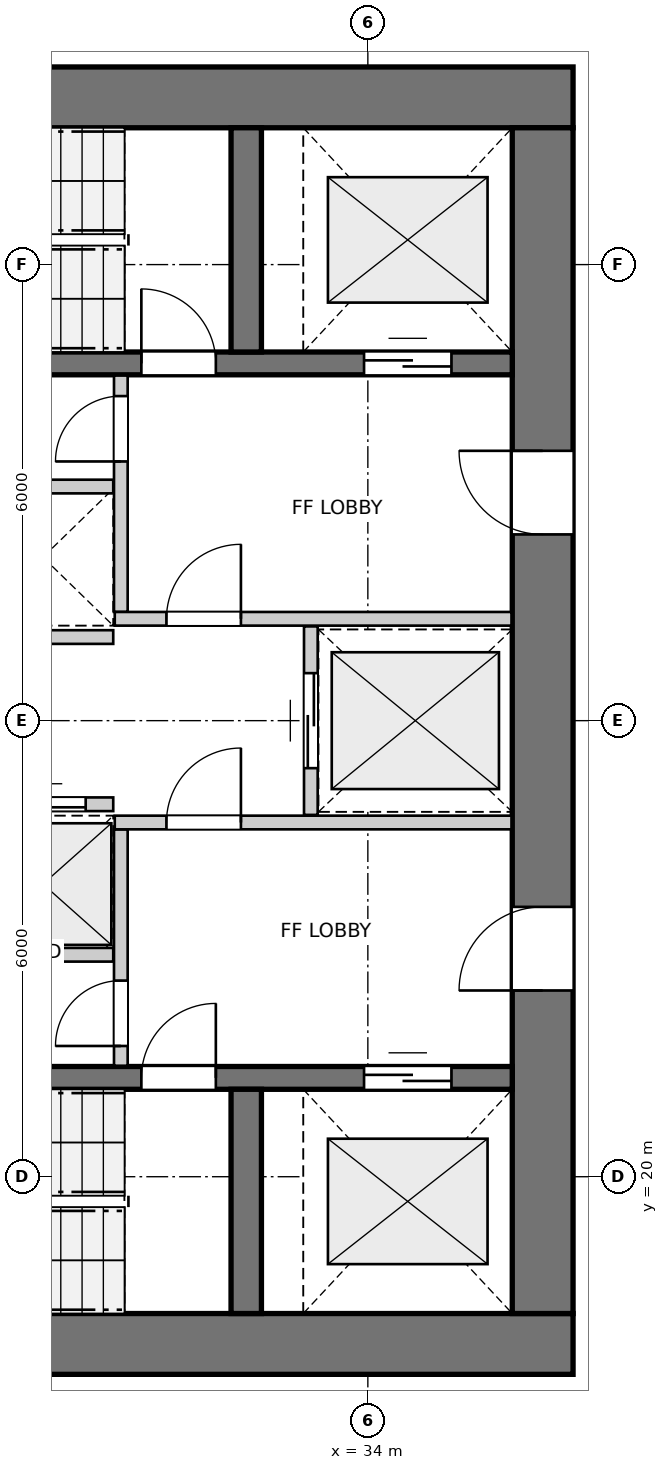
"""IFC4 building model, lengths in metres.
Left out: names, types, materials, properties, quantities, classifications, styles, units other than length and angle.
Written with IfcOpenShell. Run it as: python <this file> out.ifc"""

import sys

from ifc_helpers import new_model, si_unit, direction, frame, frame_2d, origin, place, context, subcontext, project, spatial, rectangle, extrude, source, transform, mapped, element, fill, save


model = new_model("IFC4")
c1 = context("Model", 3, precision=1e-05, world=origin(), true_north=direction((0.0, 1.0)))
c2 = subcontext(c1, "Body", "Model", "MODEL_VIEW")
j1 = project(units=[si_unit("LENGTHUNIT", "METRE"), si_unit("PLANEANGLEUNIT", "RADIAN")], contexts=[c1])
p1 = place(None, origin())
s1 = spatial("IfcSite", under=j1, at=p1, CompositionType="ELEMENT")
p2 = place(p1, origin())
s2 = spatial("IfcBuilding", under=s1, at=p2, CompositionType="ELEMENT")
p3 = place(p2, frame((0.0, 0.0, 14.2)))
s3 = spatial("IfcBuildingStorey", under=s2, at=p3, CompositionType="ELEMENT", Elevation=14.2)
for number, where, z_axis, x_axis in (
    (1, (24.0, 17.8, 0.0), (0.0, 0.0, 1.0), (1.0, 0.0, 0.0)),
    (2, (36.7, 34.2, 0.0), (0.0, 0.0, 1.0), (-1.0, 0.0, 0.0)),
):
    element("IfcWall", number, at=place(p3, frame(where, z_axis=z_axis, x_axis=x_axis)), inside=s3, PredefinedType="SHEAR", context=c2, shape_type="SweptSolid", body=[
        extrude(rectangle(XDim=12.7, YDim=0.8, at=frame_2d((6.35, 0.0))), origin(), (0.0, 0.0, 1.0), 2.94),
    ])
p4 = place(p3, frame((36.3, 18.2, 0.0), z_axis=(0.0, 0.0, 1.0), x_axis=(0.0, 1.0, 0.0)))
e3 = element("IfcWall", 3, at=p4, inside=s3, PredefinedType="SHEAR", context=c2, shape_type="SweptSolid", body=[
    extrude(rectangle(XDim=15.6, YDim=0.8, at=frame_2d((7.8, 0.0))), origin(), (0.0, 0.0, 1.0), 2.94),
])
p5 = place(p4, frame((4.25, 0.0, 0.0)))
e4 = element("IfcOpeningElement", 4, at=p5, cuts=e3, PredefinedType="OPENING", context=c2, shape_type="SweptSolid", body=[
    extrude(rectangle(XDim=1.1, YDim=2.15, at=frame_2d((0.55, 1.075))), frame((0.0, 0.41, 0.0), z_axis=(0.0, -1.0, 0.0), x_axis=(1.0, 0.0, 0.0)), (0.0, 0.0, 1.0), 0.82),
])
p6 = place(p4, frame((10.25, 0.0, 0.0)))
e5 = element("IfcOpeningElement", 5, at=p6, cuts=e3, PredefinedType="OPENING", context=c2, shape_type="SweptSolid", body=[
    extrude(rectangle(XDim=1.1, YDim=2.15, at=frame_2d((0.55, 1.075))), frame((0.0, 0.41, 0.0), z_axis=(0.0, -1.0, 0.0), x_axis=(1.0, 0.0, 0.0)), (0.0, 0.0, 1.0), 0.82),
])
p7 = place(p3, frame((24.8, 21.3, 0.0), z_axis=(0.0, 0.0, 1.0), x_axis=(1.0, 0.0, 0.0)))
e6 = element("IfcWall", 6, at=p7, inside=s3, PredefinedType="SHEAR", context=c2, shape_type="SweptSolid", body=[
    extrude(rectangle(XDim=11.1, YDim=0.3, at=frame_2d((5.55, 0.0))), origin(), (0.0, 0.0, 1.0), 2.94),
])
p8 = place(p7, frame((6.22, 0.0, 0.0)))
e7 = element("IfcOpeningElement", 7, at=p8, cuts=e6, PredefinedType="OPENING", context=c2, shape_type="SweptSolid", body=[
    extrude(rectangle(XDim=0.98, YDim=2.15, at=frame_2d((0.49, 1.075))), frame((0.0, 0.16, 0.0), z_axis=(0.0, -1.0, 0.0), x_axis=(1.0, 0.0, 0.0)), (0.0, 0.0, 1.0), 0.32),
])
p9 = place(p7, frame((9.15, 0.0, 0.0)))
e8 = element("IfcOpeningElement", 8, at=p9, cuts=e6, PredefinedType="OPENING", context=c2, shape_type="SweptSolid", body=[
    extrude(rectangle(XDim=1.15, YDim=2.15, at=frame_2d((0.575, 1.075))), frame((0.0, 0.16, 0.0), z_axis=(0.0, -1.0, 0.0), x_axis=(1.0, 0.0, 0.0)), (0.0, 0.0, 1.0), 0.32),
])
p10 = place(p3, frame((32.4, 18.2, 0.0), z_axis=(0.0, 0.0, 1.0), x_axis=(0.0, 1.0, 0.0)))
e9 = element("IfcWall", 9, at=p10, inside=s3, PredefinedType="SHEAR", context=c2, shape_type="SweptSolid", body=[
    extrude(rectangle(XDim=2.95, YDim=0.4, at=frame_2d((1.475, 0.0))), origin(), (0.0, 0.0, 1.0), 2.94),
])
p11 = place(p3, frame((24.8, 30.7, 0.0), z_axis=(0.0, 0.0, 1.0), x_axis=(1.0, 0.0, 0.0)))
e10 = element("IfcWall", 10, at=p11, inside=s3, PredefinedType="SHEAR", context=c2, shape_type="SweptSolid", body=[
    extrude(rectangle(XDim=11.1, YDim=0.3, at=frame_2d((5.55, 0.0))), origin(), (0.0, 0.0, 1.0), 2.94),
])
p12 = place(p11, frame((6.22, 0.0, 0.0)))
e11 = element("IfcOpeningElement", 11, at=p12, cuts=e10, PredefinedType="OPENING", context=c2, shape_type="SweptSolid", body=[
    extrude(rectangle(XDim=0.98, YDim=2.15, at=frame_2d((0.49, 1.075))), frame((0.0, 0.16, 0.0), z_axis=(0.0, -1.0, 0.0), x_axis=(1.0, 0.0, 0.0)), (0.0, 0.0, 1.0), 0.32),
])
p13 = place(p11, frame((9.15, 0.0, 0.0)))
e12 = element("IfcOpeningElement", 12, at=p13, cuts=e10, PredefinedType="OPENING", context=c2, shape_type="SweptSolid", body=[
    extrude(rectangle(XDim=1.15, YDim=2.15, at=frame_2d((0.575, 1.075))), frame((0.0, 0.16, 0.0), z_axis=(0.0, -1.0, 0.0), x_axis=(1.0, 0.0, 0.0)), (0.0, 0.0, 1.0), 0.32),
])
p14 = place(p3, frame((32.4, 30.85, 0.0), z_axis=(0.0, 0.0, 1.0), x_axis=(0.0, 1.0, 0.0)))
e13 = element("IfcWall", 13, at=p14, inside=s3, PredefinedType="SHEAR", context=c2, shape_type="SweptSolid", body=[
    extrude(rectangle(XDim=2.95, YDim=0.4, at=frame_2d((1.475, 0.0))), origin(), (0.0, 0.0, 1.0), 2.94),
])
p15 = place(p3, frame((30.75, 21.46, 0.0), z_axis=(0.0, 0.0, 1.0), x_axis=(0.0, 1.0, 0.0)))
e14 = element("IfcWall", 14, at=p15, inside=s3, PredefinedType="PARTITIONING", context=c2, shape_type="SweptSolid", body=[
    extrude(rectangle(XDim=3.11, YDim=0.18, at=frame_2d((1.555, 0.0))), origin(), (0.0, 0.0, 1.0), 2.94),
])
p16 = place(p15, frame((0.26, 0.0, 0.0)))
e15 = element("IfcOpeningElement", 15, at=p16, cuts=e14, PredefinedType="OPENING", context=c2, shape_type="SweptSolid", body=[
    extrude(rectangle(XDim=0.86, YDim=2.05, at=frame_2d((0.43, 1.025))), frame((0.0, 0.1, 0.0), z_axis=(0.0, -1.0, 0.0), x_axis=(1.0, 0.0, 0.0)), (0.0, 0.0, 1.0), 0.2),
])
p17 = place(p3, frame((30.67, 24.66, 0.0), z_axis=(0.0, 0.0, 1.0), x_axis=(1.0, 0.0, 0.0)))
e16 = element("IfcWall", 16, at=p17, inside=s3, PredefinedType="PARTITIONING", context=c2, shape_type="SweptSolid", body=[
    extrude(rectangle(XDim=5.22, YDim=0.18, at=frame_2d((2.61, 0.0))), origin(), (0.0, 0.0, 1.0), 2.94),
])
p18 = place(p17, frame((0.68, 0.0, 0.0)))
e17 = element("IfcOpeningElement", 17, at=p18, cuts=e16, PredefinedType="OPENING", context=c2, shape_type="SweptSolid", body=[
    extrude(rectangle(XDim=0.98, YDim=2.15, at=frame_2d((0.49, 1.075))), frame((0.0, 0.1, 0.0), z_axis=(0.0, -1.0, 0.0), x_axis=(1.0, 0.0, 0.0)), (0.0, 0.0, 1.0), 0.2),
])
p19 = place(p3, frame((30.75, 27.43, 0.0), z_axis=(0.0, 0.0, 1.0), x_axis=(0.0, 1.0, 0.0)))
e18 = element("IfcWall", 18, at=p19, inside=s3, PredefinedType="PARTITIONING", context=c2, shape_type="SweptSolid", body=[
    extrude(rectangle(XDim=3.11, YDim=0.18, at=frame_2d((1.555, 0.0))), origin(), (0.0, 0.0, 1.0), 2.94),
])
p20 = place(p19, frame((1.98, 0.0, 0.0)))
e19 = element("IfcOpeningElement", 19, at=p20, cuts=e18, PredefinedType="OPENING", context=c2, shape_type="SweptSolid", body=[
    extrude(rectangle(XDim=0.86, YDim=2.05, at=frame_2d((0.43, 1.025))), frame((0.0, 0.1, 0.0), z_axis=(0.0, -1.0, 0.0), x_axis=(1.0, 0.0, 0.0)), (0.0, 0.0, 1.0), 0.2),
])
p21 = place(p3, frame((30.67, 27.34, 0.0), z_axis=(0.0, 0.0, 1.0), x_axis=(1.0, 0.0, 0.0)))
e20 = element("IfcWall", 20, at=p21, inside=s3, PredefinedType="PARTITIONING", context=c2, shape_type="SweptSolid", body=[
    extrude(rectangle(XDim=5.22, YDim=0.18, at=frame_2d((2.61, 0.0))), origin(), (0.0, 0.0, 1.0), 2.94),
])
p22 = place(p21, frame((0.68, 0.0, 0.0)))
e21 = element("IfcOpeningElement", 21, at=p22, cuts=e20, PredefinedType="OPENING", context=c2, shape_type="SweptSolid", body=[
    extrude(rectangle(XDim=0.98, YDim=2.15, at=frame_2d((0.49, 1.075))), frame((0.0, 0.1, 0.0), z_axis=(0.0, -1.0, 0.0), x_axis=(1.0, 0.0, 0.0)), (0.0, 0.0, 1.0), 0.2),
])
p23 = place(p3, frame((33.25, 24.76, 0.0), z_axis=(0.0, 0.0, 1.0), x_axis=(0.0, 1.0, 0.0)))
e22 = element("IfcWall", 22, at=p23, inside=s3, PredefinedType="PARTITIONING", context=c2, shape_type="SweptSolid", body=[
    extrude(rectangle(XDim=2.48, YDim=0.18, at=frame_2d((1.24, 0.0))), origin(), (0.0, 0.0, 1.0), 2.94),
])
p24 = place(p23, frame((0.615, 0.0, 0.0)))
e23 = element("IfcOpeningElement", 23, at=p24, cuts=e22, PredefinedType="OPENING", context=c2, shape_type="SweptSolid", body=[
    extrude(rectangle(XDim=1.25, YDim=2.15, at=frame_2d((0.625, 1.075))), frame((0.0, 0.1, 0.0), z_axis=(0.0, -1.0, 0.0), x_axis=(1.0, 0.0, 0.0)), (0.0, 0.0, 1.0), 0.2),
])
p25 = place(p3, frame((24.81, 22.92, 0.0), z_axis=(0.0, 0.0, 1.0), x_axis=(1.0, 0.0, 0.0)))
e24 = element("IfcWall", 24, at=p25, inside=s3, PredefinedType="PARTITIONING", context=c2, shape_type="SweptSolid", body=[
    extrude(rectangle(XDim=5.84, YDim=0.18, at=frame_2d((2.92, 0.0))), origin(), (0.0, 0.0, 1.0), 2.94),
])
p26 = place(p3, frame((28.825, 24.9, 0.0), z_axis=(0.0, 0.0, 1.0), x_axis=(1.0, 0.0, 0.0)))
e25 = element("IfcWall", 25, at=p26, inside=s3, PredefinedType="PARTITIONING", context=c2, shape_type="SweptSolid", body=[
    extrude(rectangle(XDim=1.825, YDim=0.18, at=frame_2d((0.913, 0.0))), origin(), (0.0, 0.0, 1.0), 2.94),
])
p27 = place(p26, frame((0.363, 0.0, 0.0)))
e26 = element("IfcOpeningElement", 26, at=p27, cuts=e25, PredefinedType="OPENING", context=c2, shape_type="SweptSolid", body=[
    extrude(rectangle(XDim=1.1, YDim=2.15, at=frame_2d((0.55, 1.075))), frame((0.0, 0.1, 0.0), z_axis=(0.0, -1.0, 0.0), x_axis=(1.0, 0.0, 0.0)), (0.0, 0.0, 1.0), 0.2),
])
p28 = place(p3, frame((24.81, 29.08, 0.0), z_axis=(0.0, 0.0, 1.0), x_axis=(1.0, 0.0, 0.0)))
e27 = element("IfcWall", 27, at=p28, inside=s3, PredefinedType="PARTITIONING", context=c2, shape_type="SweptSolid", body=[
    extrude(rectangle(XDim=5.84, YDim=0.18, at=frame_2d((2.92, 0.0))), origin(), (0.0, 0.0, 1.0), 2.94),
])
p29 = place(p3, frame((28.825, 27.1, 0.0), z_axis=(0.0, 0.0, 1.0), x_axis=(1.0, 0.0, 0.0)))
e28 = element("IfcWall", 28, at=p29, inside=s3, PredefinedType="PARTITIONING", context=c2, shape_type="SweptSolid", body=[
    extrude(rectangle(XDim=1.825, YDim=0.18, at=frame_2d((0.913, 0.0))), origin(), (0.0, 0.0, 1.0), 2.94),
])
m1 = source(origin(), c2, "Body", "SweptSolid", [
    extrude(rectangle(XDim=0.98, YDim=2.15, at=frame_2d((0.49, 1.075))), frame((0.0, 0.025, 0.0), z_axis=(0.0, -1.0, 0.0), x_axis=(1.0, 0.0, 0.0)), (0.0, 0.0, 1.0), 0.05),
])
p30 = place(p8, origin())
e29 = element("IfcDoor", 29, at=p30, inside=s3, OperationType="SINGLE_SWING_RIGHT", PredefinedType="DOOR", context=c2, shape_type="MappedRepresentation", body=[
    mapped(m1, transform((0.0, 0.0, 0.0), x_axis=(1.0, 0.0, 0.0), y_axis=(0.0, 1.0, 0.0), z_axis=(0.0, 0.0, 1.0), scale=1.0)),
])
fill(e7, e29)
m2 = source(origin(), c2, "Body", "SweptSolid", [
    extrude(rectangle(XDim=1.15, YDim=2.15, at=frame_2d((0.575, 1.075))), frame((0.0, 0.025, 0.0), z_axis=(0.0, -1.0, 0.0), x_axis=(1.0, 0.0, 0.0)), (0.0, 0.0, 1.0), 0.05),
])
p31 = place(p9, origin())
e30 = element("IfcDoor", 30, at=p31, inside=s3, OperationType="DOUBLE_DOOR_SLIDING", PredefinedType="DOOR", context=c2, shape_type="MappedRepresentation", body=[
    mapped(m2, transform((0.0, 0.0, 0.0), x_axis=(1.0, 0.0, 0.0), y_axis=(0.0, 1.0, 0.0), z_axis=(0.0, 0.0, 1.0), scale=1.0)),
])
fill(e8, e30)
p32 = place(p12, origin())
e31 = element("IfcDoor", 31, at=p32, inside=s3, OperationType="SINGLE_SWING_LEFT", PredefinedType="DOOR", context=c2, shape_type="MappedRepresentation", body=[
    mapped(m1, transform((0.0, 0.0, 0.0), x_axis=(1.0, 0.0, 0.0), y_axis=(0.0, 1.0, 0.0), z_axis=(0.0, 0.0, 1.0), scale=1.0)),
])
fill(e11, e31)
p33 = place(p13, origin())
e32 = element("IfcDoor", 32, at=p33, inside=s3, OperationType="DOUBLE_DOOR_SLIDING", PredefinedType="DOOR", context=c2, shape_type="MappedRepresentation", body=[
    mapped(m2, transform((0.0, 0.0, 0.0), x_axis=(1.0, 0.0, 0.0), y_axis=(0.0, 1.0, 0.0), z_axis=(0.0, 0.0, 1.0), scale=1.0)),
])
fill(e12, e32)
m3 = source(origin(), c2, "Body", "SweptSolid", [
    extrude(rectangle(XDim=1.1, YDim=2.15, at=frame_2d((0.55, 1.075))), frame((0.0, 0.025, 0.0), z_axis=(0.0, -1.0, 0.0), x_axis=(1.0, 0.0, 0.0)), (0.0, 0.0, 1.0), 0.05),
])
p34 = place(p5, origin())
e33 = element("IfcDoor", 33, at=p34, inside=s3, OperationType="SINGLE_SWING_LEFT", PredefinedType="DOOR", context=c2, shape_type="MappedRepresentation", body=[
    mapped(m3, transform((0.0, 0.0, 0.0), x_axis=(1.0, 0.0, 0.0), y_axis=(0.0, 1.0, 0.0), z_axis=(0.0, 0.0, 1.0), scale=1.0)),
])
fill(e4, e33)
p35 = place(p6, origin())
e34 = element("IfcDoor", 34, at=p35, inside=s3, OperationType="SINGLE_SWING_RIGHT", PredefinedType="DOOR", context=c2, shape_type="MappedRepresentation", body=[
    mapped(m3, transform((0.0, 0.0, 0.0), x_axis=(1.0, 0.0, 0.0), y_axis=(0.0, 1.0, 0.0), z_axis=(0.0, 0.0, 1.0), scale=1.0)),
])
fill(e5, e34)
m4 = source(origin(), c2, "Body", "SweptSolid", [
    extrude(rectangle(XDim=0.86, YDim=2.05, at=frame_2d((0.43, 1.025))), frame((0.0, 0.025, 0.0), z_axis=(0.0, -1.0, 0.0), x_axis=(1.0, 0.0, 0.0)), (0.0, 0.0, 1.0), 0.05),
])
p36 = place(p16, origin())
e35 = element("IfcDoor", 35, at=p36, inside=s3, OperationType="SINGLE_SWING_LEFT", PredefinedType="DOOR", context=c2, shape_type="MappedRepresentation", body=[
    mapped(m4, transform((0.0, 0.0, 0.0), x_axis=(1.0, 0.0, 0.0), y_axis=(0.0, 1.0, 0.0), z_axis=(0.0, 0.0, 1.0), scale=1.0)),
])
fill(e15, e35)
p37 = place(p18, origin())
e36 = element("IfcDoor", 36, at=p37, inside=s3, OperationType="SINGLE_SWING_RIGHT", PredefinedType="DOOR", context=c2, shape_type="MappedRepresentation", body=[
    mapped(m1, transform((0.0, 0.0, 0.0), x_axis=(1.0, 0.0, 0.0), y_axis=(0.0, 1.0, 0.0), z_axis=(0.0, 0.0, 1.0), scale=1.0)),
])
fill(e17, e36)
p38 = place(p20, origin())
e37 = element("IfcDoor", 37, at=p38, inside=s3, OperationType="SINGLE_SWING_LEFT", PredefinedType="DOOR", context=c2, shape_type="MappedRepresentation", body=[
    mapped(m4, transform((0.0, 0.0, 0.0), x_axis=(1.0, 0.0, 0.0), y_axis=(0.0, 1.0, 0.0), z_axis=(0.0, 0.0, 1.0), scale=1.0)),
])
fill(e19, e37)
p39 = place(p22, origin())
e38 = element("IfcDoor", 38, at=p39, inside=s3, OperationType="SINGLE_SWING_RIGHT", PredefinedType="DOOR", context=c2, shape_type="MappedRepresentation", body=[
    mapped(m1, transform((0.0, 0.0, 0.0), x_axis=(1.0, 0.0, 0.0), y_axis=(0.0, 1.0, 0.0), z_axis=(0.0, 0.0, 1.0), scale=1.0)),
])
fill(e21, e38)
m5 = source(origin(), c2, "Body", "SweptSolid", [
    extrude(rectangle(XDim=1.25, YDim=2.15, at=frame_2d((0.625, 1.075))), frame((0.0, 0.025, 0.0), z_axis=(0.0, -1.0, 0.0), x_axis=(1.0, 0.0, 0.0)), (0.0, 0.0, 1.0), 0.05),
])
p40 = place(p24, origin())
e39 = element("IfcDoor", 39, at=p40, inside=s3, OperationType="DOUBLE_DOOR_SLIDING", PredefinedType="DOOR", context=c2, shape_type="MappedRepresentation", body=[
    mapped(m5, transform((0.0, 0.0, 0.0), x_axis=(1.0, 0.0, 0.0), y_axis=(0.0, 1.0, 0.0), z_axis=(0.0, 0.0, 1.0), scale=1.0)),
])
fill(e23, e39)
p41 = place(p27, origin())
e40 = element("IfcDoor", 40, at=p41, inside=s3, OperationType="DOUBLE_DOOR_SLIDING", PredefinedType="DOOR", context=c2, shape_type="MappedRepresentation", body=[
    mapped(m3, transform((0.0, 0.0, 0.0), x_axis=(1.0, 0.0, 0.0), y_axis=(0.0, 1.0, 0.0), z_axis=(0.0, 0.0, 1.0), scale=1.0)),
])
fill(e26, e40)
save(model, sys.argv[1])
